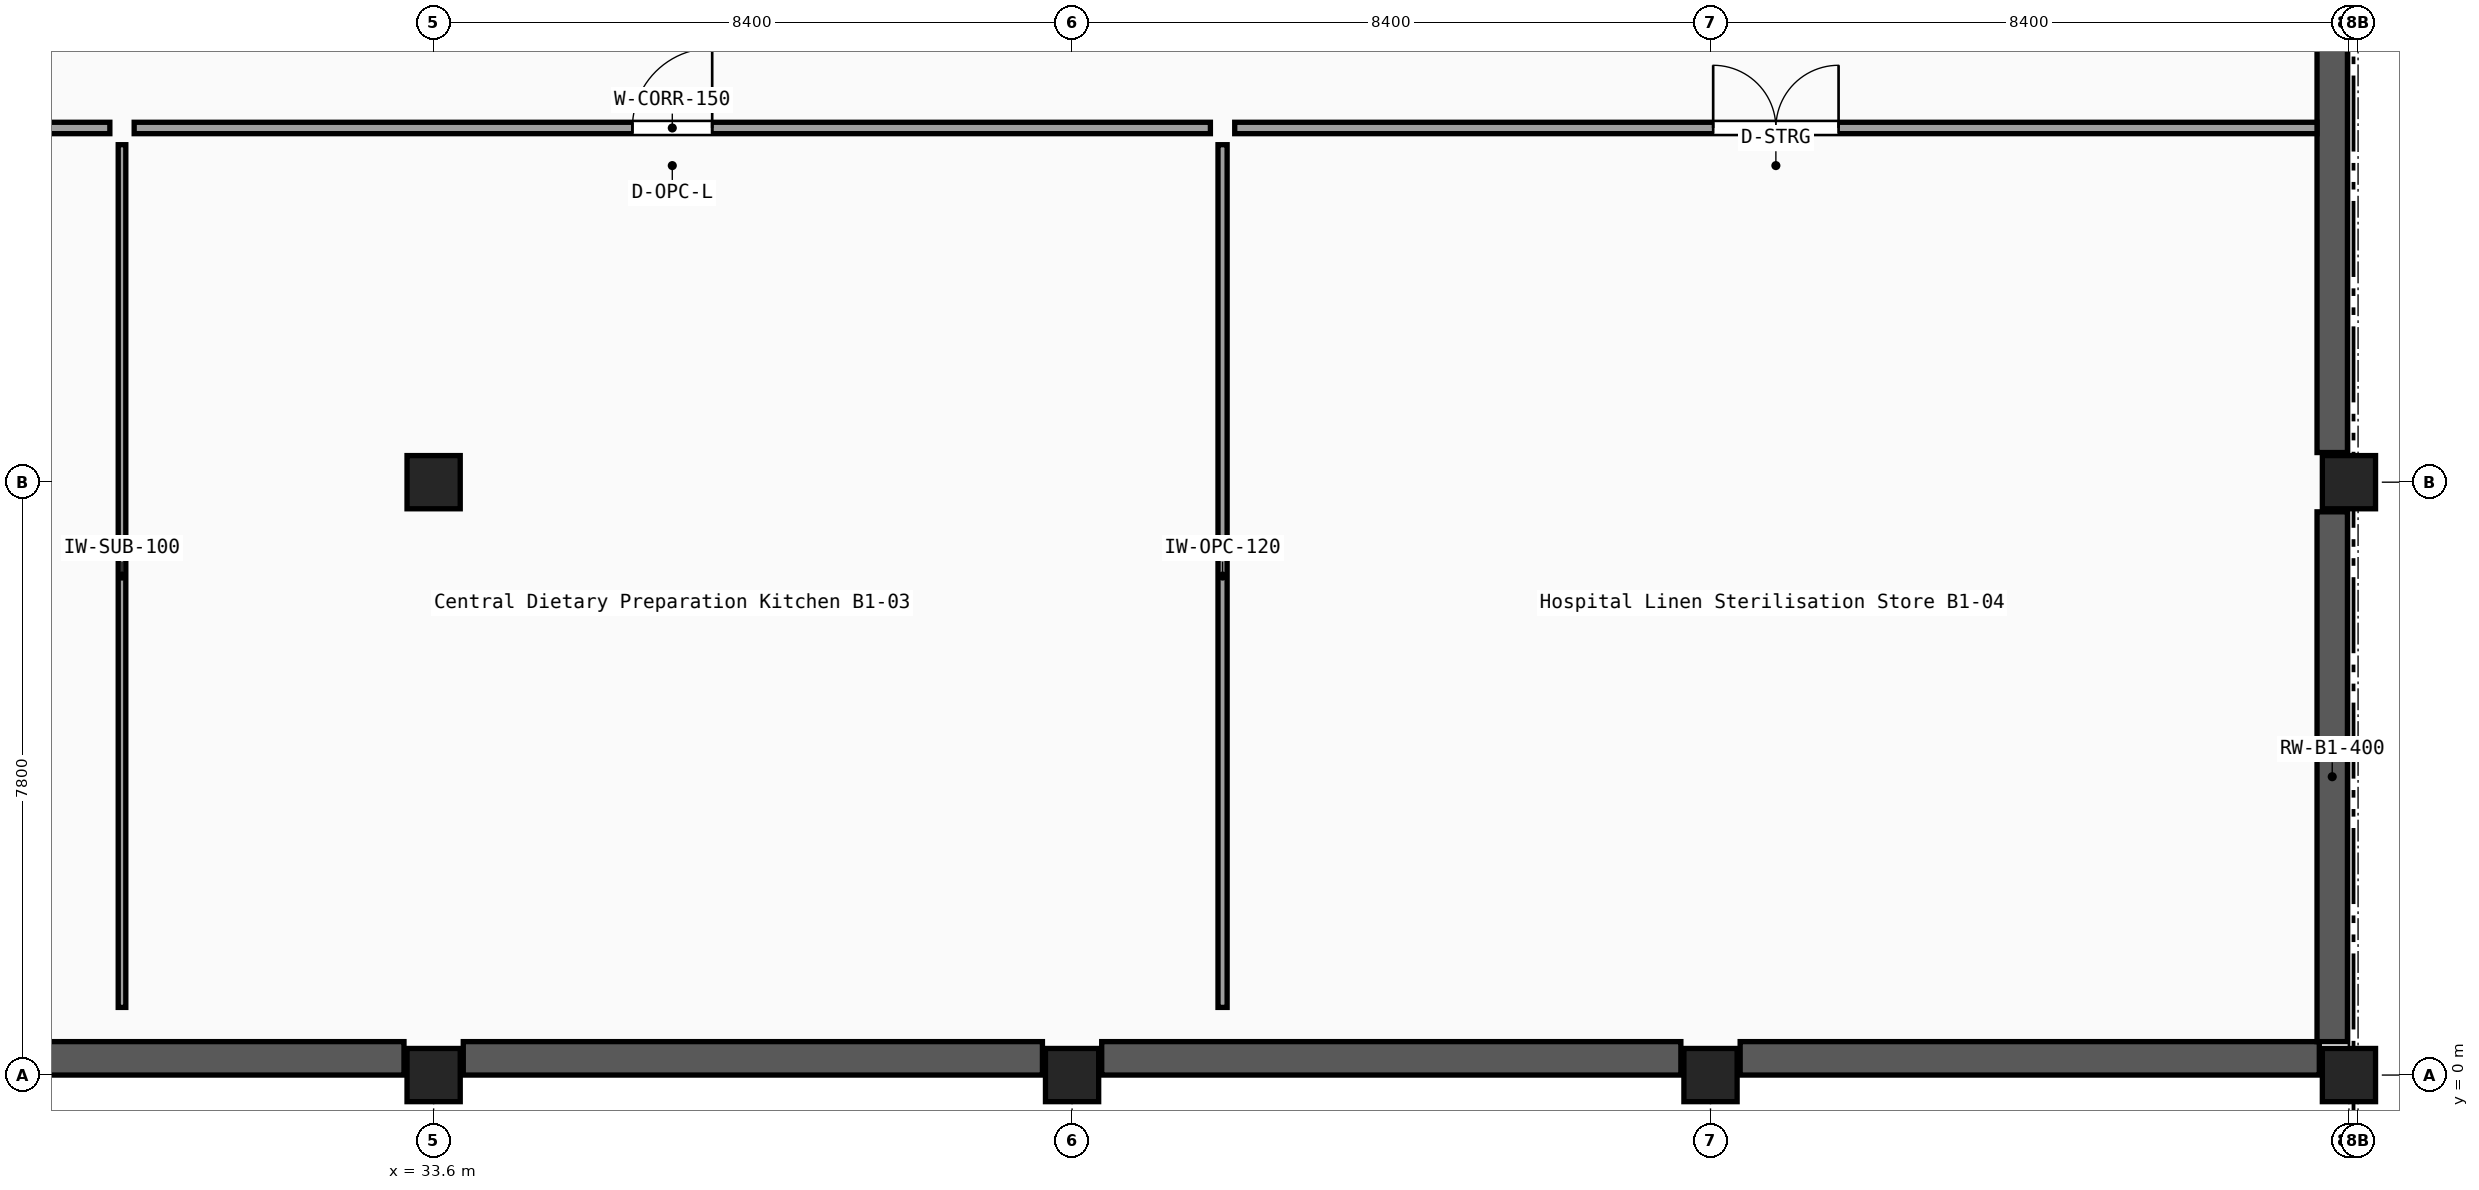
"""IFC4 building model, lengths in metres.
Left out: names, types, materials, properties, quantities, classifications, styles, units other than length and angle.
Written with IfcOpenShell. Run it as: python <this file> out.ifc"""

import sys

from ifc_helpers import new_model, si_unit, direction, frame, frame_2d, origin, origin_2d, place, context, subcontext, project, spatial, rectangle, extrude, element, fill, save


model = new_model("IFC4")
c1 = context("Model", 3, precision=1e-05, world=origin(), true_north=direction((0.0, 1.0)))
c2 = subcontext(c1, "Body", "Model", "MODEL_VIEW")
j1 = project(units=[si_unit("LENGTHUNIT", "METRE"), si_unit("PLANEANGLEUNIT", "RADIAN")], contexts=[c1])
p1 = place(None, origin())
s1 = spatial("IfcSite", under=j1, at=p1, CompositionType="ELEMENT")
p2 = place(p1, origin())
s2 = spatial("IfcBuilding", under=s1, at=p2, CompositionType="ELEMENT")
p3 = place(p2, frame((0.0, 0.0, -5.1)))
s3 = spatial("IfcBuildingStorey", under=s2, at=p3, CompositionType="ELEMENT", Elevation=-5.1)
for number, where, z_axis, x_axis in (
    (1, (33.6, 0.0, -0.22), (0.0, 0.0, 1.0), (1.0, 0.0, 0.0)),
    (2, (33.6, 7.8, -0.22), (0.0, 0.0, 1.0), (1.0, 0.0, 0.0)),
    (3, (42.0, 0.0, -0.22), (0.0, 0.0, 1.0), (1.0, 0.0, 0.0)),
    (4, (50.4, 0.0, -0.22), (0.0, 0.0, 1.0), (1.0, 0.0, 0.0)),
    (5, (58.8, 0.0, -0.22), (0.0, 0.0, 1.0), (1.0, 0.0, 0.0)),
    (6, (58.8, 7.8, -0.22), (0.0, 0.0, 1.0), (1.0, 0.0, 0.0)),
):
    element("IfcColumn", number, at=place(p3, frame(where, z_axis=z_axis, x_axis=x_axis)), inside=s3, PredefinedType="COLUMN", context=c2, shape_type="SweptSolid", body=[
        extrude(rectangle(XDim=0.7, YDim=0.7, at=origin_2d()), origin(), (0.0, 0.0, 1.0), 5.32),
    ])
p4 = place(p3, frame((25.59, 0.22, 0.0), z_axis=(0.0, 0.0, 1.0), x_axis=(1.0, 0.0, 0.0)))
e7 = element("IfcWall", 7, at=p4, inside=s3, PredefinedType="USERDEFINED", context=c2, shape_type="SweptSolid", body=[
    extrude(rectangle(XDim=7.62, YDim=0.44, at=frame_2d((3.81, 0.0))), origin(), (0.0, 0.0, 1.0), 4.43),
])
p5 = place(p3, frame((33.99, 0.22, 0.0), z_axis=(0.0, 0.0, 1.0), x_axis=(1.0, 0.0, 0.0)))
e8 = element("IfcWall", 8, at=p5, inside=s3, PredefinedType="USERDEFINED", context=c2, shape_type="SweptSolid", body=[
    extrude(rectangle(XDim=7.62, YDim=0.44, at=frame_2d((3.81, 0.0))), origin(), (0.0, 0.0, 1.0), 4.43),
])
p6 = place(p3, frame((42.39, 0.22, 0.0), z_axis=(0.0, 0.0, 1.0), x_axis=(1.0, 0.0, 0.0)))
e9 = element("IfcWall", 9, at=p6, inside=s3, PredefinedType="USERDEFINED", context=c2, shape_type="SweptSolid", body=[
    extrude(rectangle(XDim=7.62, YDim=0.44, at=frame_2d((3.81, 0.0))), origin(), (0.0, 0.0, 1.0), 4.44),
])
p7 = place(p3, frame((50.79, 0.22, 0.0), z_axis=(0.0, 0.0, 1.0), x_axis=(1.0, 0.0, 0.0)))
e10 = element("IfcWall", 10, at=p7, inside=s3, PredefinedType="USERDEFINED", context=c2, shape_type="SweptSolid", body=[
    extrude(rectangle(XDim=7.62, YDim=0.44, at=frame_2d((3.81, 0.0))), origin(), (0.0, 0.0, 1.0), 4.44),
])
p8 = place(p3, frame((58.58, 0.44, 0.0), z_axis=(0.0, 0.0, 1.0), x_axis=(0.0, 1.0, 0.0)))
e11 = element("IfcWall", 11, at=p8, inside=s3, PredefinedType="USERDEFINED", context=c2, shape_type="SweptSolid", body=[
    extrude(rectangle(XDim=6.97, YDim=0.4, at=frame_2d((3.485, 0.0))), origin(), (0.0, 0.0, 1.0), 4.44),
])
p9 = place(p3, frame((58.58, 8.19, 0.0), z_axis=(0.0, 0.0, 1.0), x_axis=(0.0, 1.0, 0.0)))
e12 = element("IfcWall", 12, at=p9, inside=s3, PredefinedType="USERDEFINED", context=c2, shape_type="SweptSolid", body=[
    extrude(rectangle(XDim=6.97, YDim=0.4, at=frame_2d((3.485, 0.0))), origin(), (0.0, 0.0, 1.0), 4.43),
])
p10 = place(p3, frame((15.18, 12.46, 0.0), z_axis=(0.0, 0.0, 1.0), x_axis=(1.0, 0.0, 0.0)))
e13 = element("IfcWall", 13, at=p10, inside=s3, PredefinedType="PARTITIONING", context=c2, shape_type="SweptSolid", body=[
    extrude(rectangle(XDim=14.16, YDim=0.15, at=frame_2d((7.08, 0.0))), origin(), (0.0, 0.0, 1.0), 4.43),
])
p11 = place(p10, frame((6.505, 0.0, 0.0)))
e14 = element("IfcOpeningElement", 14, at=p11, cuts=e13, PredefinedType="OPENING", context=c2, shape_type="SweptSolid", body=[
    extrude(rectangle(XDim=1.15, YDim=2.15, at=frame_2d((0.575, 1.075))), frame((0.0, 0.085, 0.0), z_axis=(0.0, -1.0, 0.0), x_axis=(1.0, 0.0, 0.0)), (0.0, 0.0, 1.0), 0.17),
])
p12 = place(p3, frame((29.5, 0.89, 0.0), z_axis=(0.0, 0.0, 1.0), x_axis=(0.0, 1.0, 0.0)))
e15 = element("IfcWall", 15, at=p12, inside=s3, PredefinedType="PARTITIONING", context=c2, shape_type="SweptSolid", body=[
    extrude(rectangle(XDim=11.35, YDim=0.1, at=frame_2d((5.675, 0.0))), origin(), (0.0, 0.0, 1.0), 4.33),
])
p13 = place(p3, frame((29.66, 12.46, 0.0), z_axis=(0.0, 0.0, 1.0), x_axis=(1.0, 0.0, 0.0)))
e16 = element("IfcWall", 16, at=p13, inside=s3, PredefinedType="PARTITIONING", context=c2, shape_type="SweptSolid", body=[
    extrude(rectangle(XDim=14.16, YDim=0.15, at=frame_2d((7.08, 0.0))), origin(), (0.0, 0.0, 1.0), 4.43),
])
p14 = place(p13, frame((6.555, 0.0, 0.0)))
e17 = element("IfcOpeningElement", 17, at=p14, cuts=e16, PredefinedType="OPENING", context=c2, shape_type="SweptSolid", body=[
    extrude(rectangle(XDim=1.05, YDim=2.15, at=frame_2d((0.525, 1.075))), frame((0.0, 0.085, 0.0), z_axis=(0.0, -1.0, 0.0), x_axis=(1.0, 0.0, 0.0)), (0.0, 0.0, 1.0), 0.17),
])
p15 = place(p3, frame((43.98, 0.89, 0.0), z_axis=(0.0, 0.0, 1.0), x_axis=(0.0, 1.0, 0.0)))
e18 = element("IfcWall", 18, at=p15, inside=s3, PredefinedType="PARTITIONING", context=c2, shape_type="SweptSolid", body=[
    extrude(rectangle(XDim=11.35, YDim=0.12, at=frame_2d((5.675, 0.0))), origin(), (0.0, 0.0, 1.0), 4.82),
])
p16 = place(p3, frame((44.14, 12.46, 0.0), z_axis=(0.0, 0.0, 1.0), x_axis=(1.0, 0.0, 0.0)))
e19 = element("IfcWall", 19, at=p16, inside=s3, PredefinedType="PARTITIONING", context=c2, shape_type="SweptSolid", body=[
    extrude(rectangle(XDim=14.24, YDim=0.15, at=frame_2d((7.12, 0.0))), origin(), (0.0, 0.0, 1.0), 4.82),
])
p17 = place(p16, frame((6.295, 0.0, 0.0)))
e20 = element("IfcOpeningElement", 20, at=p17, cuts=e19, PredefinedType="OPENING", context=c2, shape_type="SweptSolid", body=[
    extrude(rectangle(XDim=1.65, YDim=2.2, at=frame_2d((0.825, 1.1))), frame((0.0, 0.085, 0.0), z_axis=(0.0, -1.0, 0.0), x_axis=(1.0, 0.0, 0.0)), (0.0, 0.0, 1.0), 0.17),
])
p18 = place(p14, origin())
e21 = element("IfcDoor", 21, at=p18, inside=s3, OperationType="SINGLE_SWING_RIGHT", PredefinedType="DOOR", context=c2, shape_type="SweptSolid", body=[
    extrude(rectangle(XDim=1.05, YDim=2.15, at=frame_2d((0.525, 1.075))), frame((0.0, 0.025, 0.0), z_axis=(0.0, -1.0, 0.0), x_axis=(1.0, 0.0, 0.0)), (0.0, 0.0, 1.0), 0.05),
])
fill(e17, e21)
p19 = place(p17, origin())
e22 = element("IfcDoor", 22, at=p19, inside=s3, OperationType="DOUBLE_DOOR_SINGLE_SWING", PredefinedType="DOOR", context=c2, shape_type="SweptSolid", body=[
    extrude(rectangle(XDim=1.65, YDim=2.2, at=frame_2d((0.825, 1.1))), frame((0.0, 0.025, 0.0), z_axis=(0.0, -1.0, 0.0), x_axis=(1.0, 0.0, 0.0)), (0.0, 0.0, 1.0), 0.05),
])
fill(e20, e22)
save(model, sys.argv[1])
